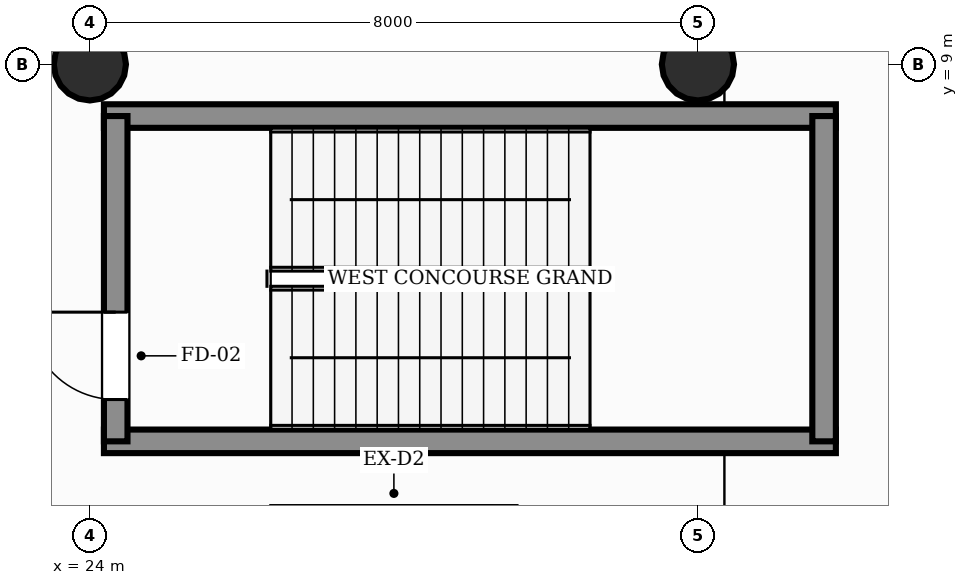
"""IFC4 building model, lengths in metres.
Left out: names, types, materials, properties, quantities, classifications, styles, units other than length and angle.
Written with IfcOpenShell. Run it as: python <this file> out.ifc"""

import sys

from ifc_helpers import new_model, si_unit, direction, frame, frame_2d, origin, origin_2d, place, context, subcontext, project, spatial, rectangle, circle, extrude, element, fill, save


model = new_model("IFC4")
c1 = context("Model", 3, precision=1e-05, world=origin(), true_north=direction((0.0, 1.0)))
c2 = subcontext(c1, "Body", "Model", "MODEL_VIEW")
j1 = project(units=[si_unit("LENGTHUNIT", "METRE"), si_unit("PLANEANGLEUNIT", "RADIAN")], contexts=[c1])
p1 = place(None, origin())
s1 = spatial("IfcSite", under=j1, at=p1, CompositionType="ELEMENT")
p2 = place(p1, origin())
s2 = spatial("IfcBuilding", under=s1, at=p2, CompositionType="ELEMENT")
p3 = place(p2, origin())
s3 = spatial("IfcBuildingStorey", under=s2, at=p3, CompositionType="ELEMENT", Elevation=0.0)
for number, where, z_axis, x_axis in (
    (1, (24.0, 9.0, 0.0), (0.0, 0.0, 1.0), (1.0, 0.0, 0.0)),
    (2, (32.0, 9.0, 0.0), (0.0, 0.0, 1.0), (1.0, 0.0, 0.0)),
):
    element("IfcColumn", number, at=place(p3, frame(where, z_axis=z_axis, x_axis=x_axis)), inside=s3, PredefinedType="COLUMN", context=c2, shape_type="SweptSolid", body=[
        extrude(circle(Radius=0.475, at=origin_2d()), origin(), (0.0, 0.0, 1.0), 6.0),
    ])
for number, where, z_axis, x_axis in (
    (3, (24.185, 4.04, 0.0), (0.0, 0.0, 1.0), (1.0, 0.0, 0.0)),
    (4, (24.185, 8.32, 0.0), (0.0, 0.0, 1.0), (1.0, 0.0, 0.0)),
):
    element("IfcWall", number, at=place(p3, frame(where, z_axis=z_axis, x_axis=x_axis)), inside=s3, PredefinedType="SHEAR", context=c2, shape_type="SweptSolid", body=[
        extrude(rectangle(XDim=9.63, YDim=0.31, at=frame_2d((4.815, 0.0))), origin(), (0.0, 0.0, 1.0), 6.0),
    ])
p4 = place(p3, frame((24.34, 4.04, 0.0), z_axis=(0.0, 0.0, 1.0), x_axis=(0.0, 1.0, 0.0)))
e5 = element("IfcWall", 5, at=p4, inside=s3, PredefinedType="SHEAR", context=c2, shape_type="SweptSolid", body=[
    extrude(rectangle(XDim=4.28, YDim=0.31, at=frame_2d((2.14, 0.0))), origin(), (0.0, 0.0, 1.0), 6.0),
])
p5 = place(p4, frame((0.55, 0.0, 0.0)))
e6 = element("IfcOpeningElement", 6, at=p5, cuts=e5, PredefinedType="OPENING", context=c2, shape_type="SweptSolid", body=[
    extrude(rectangle(XDim=1.15, YDim=2.2, at=frame_2d((0.575, 1.1))), frame((0.0, 0.165, 0.0), z_axis=(0.0, -1.0, 0.0), x_axis=(1.0, 0.0, 0.0)), (0.0, 0.0, 1.0), 0.33),
])
p6 = place(p3, frame((33.66, 4.04, 0.0), z_axis=(0.0, 0.0, 1.0), x_axis=(0.0, 1.0, 0.0)))
e7 = element("IfcWall", 7, at=p6, inside=s3, PredefinedType="SHEAR", context=c2, shape_type="SweptSolid", body=[
    extrude(rectangle(XDim=4.28, YDim=0.31, at=frame_2d((2.14, 0.0))), origin(), (0.0, 0.0, 1.0), 6.0),
])
p7 = place(p5, origin())
e8 = element("IfcDoor", 8, at=p7, inside=s3, OperationType="SINGLE_SWING_RIGHT", PredefinedType="DOOR", context=c2, shape_type="SweptSolid", body=[
    extrude(rectangle(XDim=1.15, YDim=2.2, at=frame_2d((0.575, 1.1))), frame((0.0, 0.025, 0.0), z_axis=(0.0, -1.0, 0.0), x_axis=(1.0, 0.0, 0.0)), (0.0, 0.0, 1.0), 0.05),
])
fill(e6, e8)
save(model, sys.argv[1])
